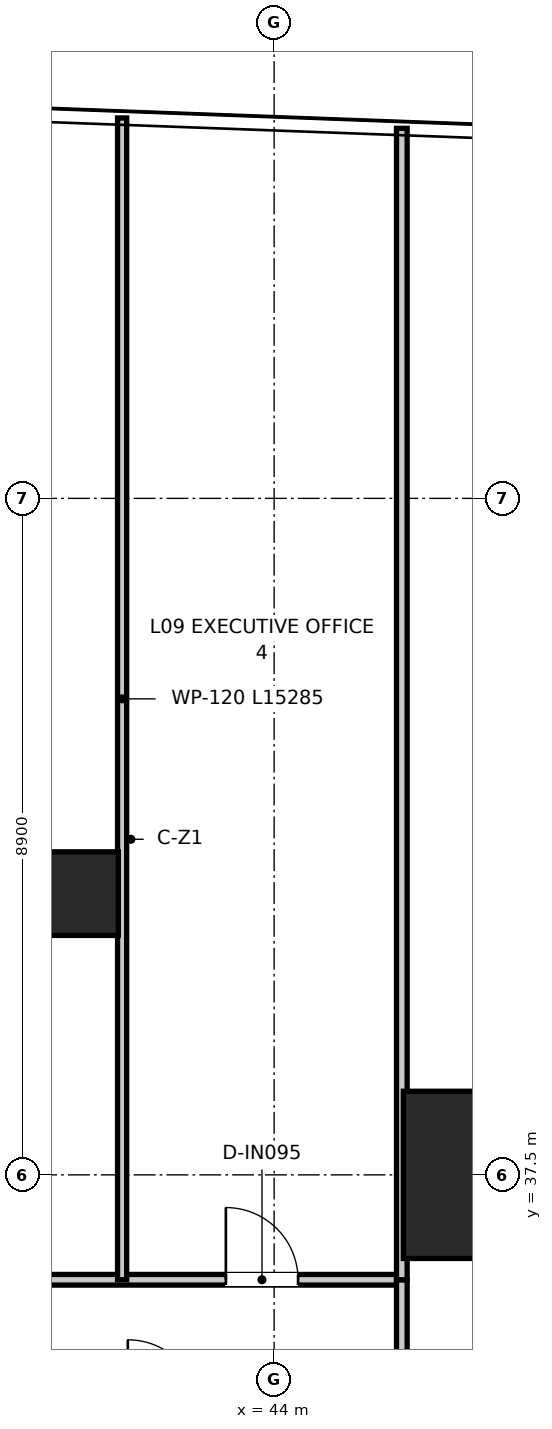
"""IFC4 building model, lengths in metres.
Left out: names, types, materials, properties, quantities, classifications, styles, units other than length and angle.
Written with IfcOpenShell. Run it as: python <this file> out.ifc"""

import sys

from ifc_helpers import new_model, si_unit, direction, frame, frame_2d, origin, origin_2d, place, context, subcontext, project, spatial, rectangle, extrude, source, transform, mapped, element, fill, save


model = new_model("IFC4")
c1 = context("Model", 3, precision=1e-05, world=origin(), true_north=direction((0.0, 1.0)))
c2 = subcontext(c1, "Body", "Model", "MODEL_VIEW")
j1 = project(units=[si_unit("LENGTHUNIT", "METRE"), si_unit("PLANEANGLEUNIT", "RADIAN")], contexts=[c1])
p1 = place(None, origin())
s1 = spatial("IfcSite", under=j1, at=p1, CompositionType="ELEMENT")
p2 = place(p1, origin())
s2 = spatial("IfcBuilding", under=s1, at=p2, CompositionType="ELEMENT")
p3 = place(p2, frame((0.0, 0.0, 40.8)))
s3 = spatial("IfcBuildingStorey", under=s2, at=p3, CompositionType="ELEMENT", Elevation=40.8)
m1 = source(origin(), c2, "Body", "SweptSolid", [
    extrude(rectangle(XDim=2.2, YDim=2.2, at=origin_2d()), origin(), (0.0, 0.0, 1.0), 3.95),
])
p4 = place(p3, frame((46.8, 37.5, 0.0), z_axis=(0.0, 0.0, 1.0), x_axis=(1.0, 0.0, 0.0)))
e1 = element("IfcColumn", 1, at=p4, inside=s3, PredefinedType="USERDEFINED", context=c2, shape_type="MappedRepresentation", body=[
    mapped(m1, transform((0.0, 0.0, 0.0), x_axis=(1.0, 0.0, 0.0), y_axis=(0.0, 1.0, 0.0), z_axis=(0.0, 0.0, 1.0), scale=1.0)),
])
m2 = source(origin(), c2, "Body", "SweptSolid", [
    extrude(rectangle(XDim=1.1, YDim=1.1, at=origin_2d()), origin(), (0.0, 0.0, 1.0), 3.95),
])
p5 = place(p3, frame((41.4, 41.2, 0.0), z_axis=(0.0, 0.0, 1.0), x_axis=(1.0, 0.0, 0.0)))
e2 = element("IfcColumn", 2, at=p5, inside=s3, PredefinedType="COLUMN", context=c2, shape_type="MappedRepresentation", body=[
    mapped(m2, transform((0.0, 0.0, 0.0), x_axis=(1.0, 0.0, 0.0), y_axis=(0.0, 1.0, 0.0), z_axis=(0.0, 0.0, 1.0), scale=1.0)),
])
p6 = place(p3, frame((26.32, 36.12, 0.0), z_axis=(0.0, 0.0, 1.0), x_axis=(1.0, 0.0, 0.0)))
e3 = element("IfcWall", 3, at=p6, inside=s3, PredefinedType="PARTITIONING", context=c2, shape_type="SweptSolid", body=[
    extrude(rectangle(XDim=19.36, YDim=0.14, at=frame_2d((9.68, 0.0))), origin(), (0.0, 0.0, 1.0), 3.08),
])
p7 = place(p6, frame((1.365, 0.0, 0.0)))
e4 = element("IfcOpeningElement", 4, at=p7, cuts=e3, PredefinedType="OPENING", context=c2, shape_type="SweptSolid", body=[
    extrude(rectangle(XDim=0.95, YDim=2.1, at=frame_2d((0.475, 1.05))), frame((0.0, 0.08, 0.0), z_axis=(0.0, -1.0, 0.0), x_axis=(1.0, 0.0, 0.0)), (0.0, 0.0, 1.0), 0.16),
])
p8 = place(p6, frame((6.205, 0.0, 0.0)))
e5 = element("IfcOpeningElement", 5, at=p8, cuts=e3, PredefinedType="OPENING", context=c2, shape_type="SweptSolid", body=[
    extrude(rectangle(XDim=0.95, YDim=2.1, at=frame_2d((0.475, 1.05))), frame((0.0, 0.08, 0.0), z_axis=(0.0, -1.0, 0.0), x_axis=(1.0, 0.0, 0.0)), (0.0, 0.0, 1.0), 0.16),
])
p9 = place(p6, frame((12.205, 0.0, 0.0)))
e6 = element("IfcOpeningElement", 6, at=p9, cuts=e3, PredefinedType="OPENING", context=c2, shape_type="SweptSolid", body=[
    extrude(rectangle(XDim=0.95, YDim=2.1, at=frame_2d((0.475, 1.05))), frame((0.0, 0.08, 0.0), z_axis=(0.0, -1.0, 0.0), x_axis=(1.0, 0.0, 0.0)), (0.0, 0.0, 1.0), 0.16),
])
p10 = place(p6, frame((17.045, 0.0, 0.0)))
e7 = element("IfcOpeningElement", 7, at=p10, cuts=e3, PredefinedType="OPENING", context=c2, shape_type="SweptSolid", body=[
    extrude(rectangle(XDim=0.95, YDim=2.1, at=frame_2d((0.475, 1.05))), frame((0.0, 0.08, 0.0), z_axis=(0.0, -1.0, 0.0), x_axis=(1.0, 0.0, 0.0)), (0.0, 0.0, 1.0), 0.16),
])
p11 = place(p3, frame((45.68, 10.5, 0.0), z_axis=(0.0, 0.0, 1.0), x_axis=(0.0, 1.0, 0.0)))
e8 = element("IfcWall", 8, at=p11, inside=s3, PredefinedType="PARTITIONING", context=c2, shape_type="SweptSolid", body=[
    extrude(rectangle(XDim=25.62, YDim=0.14, at=frame_2d((12.81, 0.0))), origin(), (0.0, 0.0, 1.0), 2.97),
])
p12 = place(p11, frame((7.675, 0.0, 0.0)))
e9 = element("IfcOpeningElement", 9, at=p12, cuts=e8, PredefinedType="OPENING", context=c2, shape_type="SweptSolid", body=[
    extrude(rectangle(XDim=0.95, YDim=2.1, at=frame_2d((0.475, 1.05))), frame((0.0, 0.08, 0.0), z_axis=(0.0, -1.0, 0.0), x_axis=(1.0, 0.0, 0.0)), (0.0, 0.0, 1.0), 0.16),
])
p13 = place(p11, frame((11.325, 0.0, 0.0)))
e10 = element("IfcOpeningElement", 10, at=p13, cuts=e8, PredefinedType="OPENING", context=c2, shape_type="SweptSolid", body=[
    extrude(rectangle(XDim=0.95, YDim=2.1, at=frame_2d((0.475, 1.05))), frame((0.0, 0.08, 0.0), z_axis=(0.0, -1.0, 0.0), x_axis=(1.0, 0.0, 0.0)), (0.0, 0.0, 1.0), 0.16),
])
p14 = place(p11, frame((16.325, 0.0, 0.0)))
e11 = element("IfcOpeningElement", 11, at=p14, cuts=e8, PredefinedType="OPENING", context=c2, shape_type="SweptSolid", body=[
    extrude(rectangle(XDim=0.95, YDim=2.1, at=frame_2d((0.475, 1.05))), frame((0.0, 0.08, 0.0), z_axis=(0.0, -1.0, 0.0), x_axis=(1.0, 0.0, 0.0)), (0.0, 0.0, 1.0), 0.16),
])
p15 = place(p11, frame((20.625, 0.0, 0.0)))
e12 = element("IfcOpeningElement", 12, at=p15, cuts=e8, PredefinedType="OPENING", context=c2, shape_type="SweptSolid", body=[
    extrude(rectangle(XDim=0.95, YDim=2.1, at=frame_2d((0.475, 1.05))), frame((0.0, 0.08, 0.0), z_axis=(0.0, -1.0, 0.0), x_axis=(1.0, 0.0, 0.0)), (0.0, 0.0, 1.0), 0.16),
])
p16 = place(p11, frame((23.075, 0.0, 0.0)))
e13 = element("IfcOpeningElement", 13, at=p16, cuts=e8, PredefinedType="OPENING", context=c2, shape_type="SweptSolid", body=[
    extrude(rectangle(XDim=0.95, YDim=2.1, at=frame_2d((0.475, 1.05))), frame((0.0, 0.08, 0.0), z_axis=(0.0, -1.0, 0.0), x_axis=(1.0, 0.0, 0.0)), (0.0, 0.0, 1.0), 0.16),
])
p17 = place(p3, frame((45.68, 36.12, 0.0), z_axis=(0.0, 0.0, 1.0), x_axis=(0.0, 1.0, 0.0)))
e14 = element("IfcWall", 14, at=p17, inside=s3, PredefinedType="PARTITIONING", context=c2, shape_type="SweptSolid", body=[
    extrude(rectangle(XDim=15.148, YDim=0.14, at=frame_2d((7.574, 0.0))), origin(), (0.0, 0.0, 1.0), 2.97),
])
p18 = place(p3, frame((42.0, 36.12, 0.0), z_axis=(0.0, 0.0, 1.0), x_axis=(0.0, 1.0, 0.0)))
e15 = element("IfcWall", 15, at=p18, inside=s3, PredefinedType="PARTITIONING", context=c2, shape_type="SweptSolid", body=[
    extrude(rectangle(XDim=15.284, YDim=0.12, at=frame_2d((7.642, 0.0))), origin(), (0.0, 0.0, 1.0), 2.97),
])
p19 = place(p10, origin())
e16 = element("IfcDoor", 16, at=p19, inside=s3, OperationType="SINGLE_SWING_LEFT", PredefinedType="DOOR", context=c2, shape_type="SweptSolid", body=[
    extrude(rectangle(XDim=0.95, YDim=2.1, at=frame_2d((0.475, 1.05))), frame((0.0, 0.025, 0.0), z_axis=(0.0, -1.0, 0.0), x_axis=(1.0, 0.0, 0.0)), (0.0, 0.0, 1.0), 0.05),
])
fill(e7, e16)
save(model, sys.argv[1])
